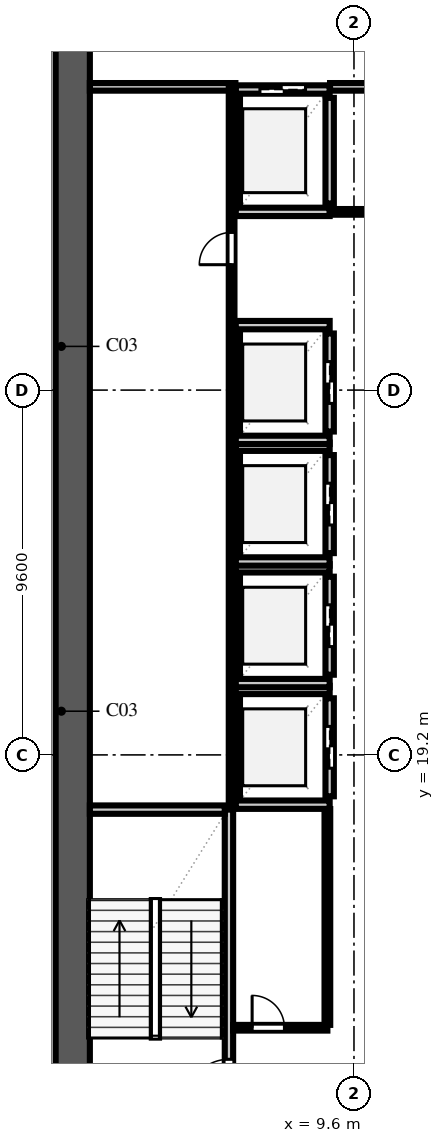
"""IFC4 building model, lengths in metres.
Left out: names, types, materials, properties, quantities, classifications, styles, units other than length and angle.
Written with IfcOpenShell. Run it as: python <this file> out.ifc"""

import sys

from ifc_helpers import new_model, si_unit, direction, frame, frame_2d, origin, place, context, subcontext, project, spatial, rectangle, extrude, element, fill, save


model = new_model("IFC4")
c1 = context("Model", 3, precision=1e-05, world=origin(), true_north=direction((0.0, 1.0)))
c2 = subcontext(c1, "Body", "Model", "MODEL_VIEW")
j1 = project(units=[si_unit("LENGTHUNIT", "METRE"), si_unit("PLANEANGLEUNIT", "RADIAN")], contexts=[c1])
p1 = place(None, origin())
s1 = spatial("IfcSite", under=j1, at=p1, CompositionType="ELEMENT")
p2 = place(p1, origin())
s2 = spatial("IfcBuilding", under=s1, at=p2, CompositionType="ELEMENT")
p3 = place(p2, frame((0.0, 0.0, 96.4)))
s3 = spatial("IfcBuildingStorey", under=s2, at=p3, CompositionType="ELEMENT", Elevation=96.4)
p4 = place(p3, frame((2.2, 9.15, 0.0), z_axis=(0.0, 0.0, 1.0), x_axis=(0.0, 1.0, 0.0)))
e1 = element("IfcWall", 1, at=p4, inside=s3, PredefinedType="SHEAR", context=c2, shape_type="SweptSolid", body=[
    extrude(rectangle(XDim=39.3, YDim=0.9, at=frame_2d((19.65, 0.0))), origin(), (0.0, 0.0, 1.0), 4.74),
])
p5 = place(p3, frame((6.31, 9.95, 0.0), z_axis=(0.0, 0.0, 1.0), x_axis=(0.0, 1.0, 0.0)))
e2 = element("IfcWall", 2, at=p5, inside=s3, PredefinedType="SOLIDWALL", context=c2, shape_type="SweptSolid", body=[
    extrude(rectangle(XDim=7.81, YDim=0.22, at=frame_2d((3.905, 0.0))), origin(), (0.0, 0.0, 1.0), 4.74),
])
p6 = place(p5, frame((0.14, 0.0, 0.0)))
e3 = element("IfcOpeningElement", 3, at=p6, cuts=e2, PredefinedType="OPENING", context=c2, shape_type="SweptSolid", body=[
    extrude(rectangle(XDim=1.1, YDim=2.2, at=frame_2d((0.55, 1.1))), frame((0.0, 0.122, 0.0), z_axis=(0.0, -1.0, 0.0), x_axis=(1.0, 0.0, 0.0)), (0.0, 0.0, 1.0), 0.244),
])
p7 = place(p3, frame((2.65, 17.76, 0.0), z_axis=(0.0, 0.0, 1.0), x_axis=(1.0, 0.0, 0.0)))
e4 = element("IfcWall", 4, at=p7, inside=s3, PredefinedType="SOLIDWALL", context=c2, shape_type="SweptSolid", body=[
    extrude(rectangle(XDim=3.55, YDim=0.22, at=frame_2d((1.775, 0.0))), origin(), (0.0, 0.0, 1.0), 4.74),
])
p8 = place(p3, frame((6.49, 18.11, 0.0), z_axis=(0.0, 0.0, 1.0), x_axis=(0.0, 1.0, 0.0)))
e5 = element("IfcWall", 5, at=p8, inside=s3, PredefinedType="SOLIDWALL", context=c2, shape_type="SweptSolid", body=[
    extrude(rectangle(XDim=2.58, YDim=0.22, at=frame_2d((1.29, 0.0))), origin(), (0.0, 0.0, 1.0), 4.74),
])
p9 = place(p3, frame((8.96, 18.11, 0.0), z_axis=(0.0, 0.0, 1.0), x_axis=(0.0, 1.0, 0.0)))
e6 = element("IfcWall", 6, at=p9, inside=s3, PredefinedType="SOLIDWALL", context=c2, shape_type="SweptSolid", body=[
    extrude(rectangle(XDim=2.58, YDim=0.22, at=frame_2d((1.29, 0.0))), origin(), (0.0, 0.0, 1.0), 4.74),
])
p10 = place(p9, frame((0.74, 0.0, 0.0)))
e7 = element("IfcOpeningElement", 7, at=p10, cuts=e6, PredefinedType="OPENING", context=c2, shape_type="SweptSolid", body=[
    extrude(rectangle(XDim=1.1, YDim=2.2, at=frame_2d((0.55, 1.1))), frame((0.0, 0.122, 0.0), z_axis=(0.0, -1.0, 0.0), x_axis=(1.0, 0.0, 0.0)), (0.0, 0.0, 1.0), 0.244),
])
for number, where, z_axis, x_axis in (
    (8, (6.49, 17.89, 0.0), (0.0, 0.0, 1.0), (1.0, 0.0, 0.0)),
    (9, (6.49, 20.91, 0.0), (0.0, 0.0, 1.0), (1.0, 0.0, 0.0)),
):
    element("IfcWall", number, at=place(p3, frame(where, z_axis=z_axis, x_axis=x_axis)), inside=s3, PredefinedType="SOLIDWALL", context=c2, shape_type="SweptSolid", body=[
        extrude(rectangle(XDim=2.47, YDim=0.22, at=frame_2d((1.235, 0.0))), origin(), (0.0, 0.0, 1.0), 4.74),
    ])
p11 = place(p3, frame((6.49, 21.31, 0.0), z_axis=(0.0, 0.0, 1.0), x_axis=(0.0, 1.0, 0.0)))
e10 = element("IfcWall", 10, at=p11, inside=s3, PredefinedType="SOLIDWALL", context=c2, shape_type="SweptSolid", body=[
    extrude(rectangle(XDim=2.58, YDim=0.22, at=frame_2d((1.29, 0.0))), origin(), (0.0, 0.0, 1.0), 4.74),
])
p12 = place(p3, frame((8.96, 21.31, 0.0), z_axis=(0.0, 0.0, 1.0), x_axis=(0.0, 1.0, 0.0)))
e11 = element("IfcWall", 11, at=p12, inside=s3, PredefinedType="SOLIDWALL", context=c2, shape_type="SweptSolid", body=[
    extrude(rectangle(XDim=2.58, YDim=0.22, at=frame_2d((1.29, 0.0))), origin(), (0.0, 0.0, 1.0), 4.74),
])
p13 = place(p12, frame((0.74, 0.0, 0.0)))
e12 = element("IfcOpeningElement", 12, at=p13, cuts=e11, PredefinedType="OPENING", context=c2, shape_type="SweptSolid", body=[
    extrude(rectangle(XDim=1.1, YDim=2.2, at=frame_2d((0.55, 1.1))), frame((0.0, 0.122, 0.0), z_axis=(0.0, -1.0, 0.0), x_axis=(1.0, 0.0, 0.0)), (0.0, 0.0, 1.0), 0.244),
])
for number, where, z_axis, x_axis in (
    (13, (6.49, 21.09, 0.0), (0.0, 0.0, 1.0), (1.0, 0.0, 0.0)),
    (14, (6.49, 24.11, 0.0), (0.0, 0.0, 1.0), (1.0, 0.0, 0.0)),
):
    element("IfcWall", number, at=place(p3, frame(where, z_axis=z_axis, x_axis=x_axis)), inside=s3, PredefinedType="SOLIDWALL", context=c2, shape_type="SweptSolid", body=[
        extrude(rectangle(XDim=2.47, YDim=0.22, at=frame_2d((1.235, 0.0))), origin(), (0.0, 0.0, 1.0), 4.74),
    ])
p14 = place(p3, frame((6.49, 24.51, 0.0), z_axis=(0.0, 0.0, 1.0), x_axis=(0.0, 1.0, 0.0)))
e15 = element("IfcWall", 15, at=p14, inside=s3, PredefinedType="SOLIDWALL", context=c2, shape_type="SweptSolid", body=[
    extrude(rectangle(XDim=2.58, YDim=0.22, at=frame_2d((1.29, 0.0))), origin(), (0.0, 0.0, 1.0), 4.74),
])
p15 = place(p3, frame((8.96, 24.51, 0.0), z_axis=(0.0, 0.0, 1.0), x_axis=(0.0, 1.0, 0.0)))
e16 = element("IfcWall", 16, at=p15, inside=s3, PredefinedType="SOLIDWALL", context=c2, shape_type="SweptSolid", body=[
    extrude(rectangle(XDim=2.58, YDim=0.22, at=frame_2d((1.29, 0.0))), origin(), (0.0, 0.0, 1.0), 4.74),
])
p16 = place(p15, frame((0.74, 0.0, 0.0)))
e17 = element("IfcOpeningElement", 17, at=p16, cuts=e16, PredefinedType="OPENING", context=c2, shape_type="SweptSolid", body=[
    extrude(rectangle(XDim=1.1, YDim=2.2, at=frame_2d((0.55, 1.1))), frame((0.0, 0.122, 0.0), z_axis=(0.0, -1.0, 0.0), x_axis=(1.0, 0.0, 0.0)), (0.0, 0.0, 1.0), 0.244),
])
for number, where, z_axis, x_axis in (
    (18, (6.49, 24.29, 0.0), (0.0, 0.0, 1.0), (1.0, 0.0, 0.0)),
    (19, (6.49, 27.31, 0.0), (0.0, 0.0, 1.0), (1.0, 0.0, 0.0)),
):
    element("IfcWall", number, at=place(p3, frame(where, z_axis=z_axis, x_axis=x_axis)), inside=s3, PredefinedType="SOLIDWALL", context=c2, shape_type="SweptSolid", body=[
        extrude(rectangle(XDim=2.47, YDim=0.22, at=frame_2d((1.235, 0.0))), origin(), (0.0, 0.0, 1.0), 4.74),
    ])
p17 = place(p3, frame((6.49, 27.71, 0.0), z_axis=(0.0, 0.0, 1.0), x_axis=(0.0, 1.0, 0.0)))
e20 = element("IfcWall", 20, at=p17, inside=s3, PredefinedType="SOLIDWALL", context=c2, shape_type="SweptSolid", body=[
    extrude(rectangle(XDim=2.58, YDim=0.22, at=frame_2d((1.29, 0.0))), origin(), (0.0, 0.0, 1.0), 4.74),
])
p18 = place(p3, frame((8.96, 27.71, 0.0), z_axis=(0.0, 0.0, 1.0), x_axis=(0.0, 1.0, 0.0)))
e21 = element("IfcWall", 21, at=p18, inside=s3, PredefinedType="SOLIDWALL", context=c2, shape_type="SweptSolid", body=[
    extrude(rectangle(XDim=2.58, YDim=0.22, at=frame_2d((1.29, 0.0))), origin(), (0.0, 0.0, 1.0), 4.74),
])
p19 = place(p18, frame((0.74, 0.0, 0.0)))
e22 = element("IfcOpeningElement", 22, at=p19, cuts=e21, PredefinedType="OPENING", context=c2, shape_type="SweptSolid", body=[
    extrude(rectangle(XDim=1.1, YDim=2.2, at=frame_2d((0.55, 1.1))), frame((0.0, 0.122, 0.0), z_axis=(0.0, -1.0, 0.0), x_axis=(1.0, 0.0, 0.0)), (0.0, 0.0, 1.0), 0.244),
])
for number, where, z_axis, x_axis in (
    (23, (6.49, 27.49, 0.0), (0.0, 0.0, 1.0), (1.0, 0.0, 0.0)),
    (24, (6.49, 30.51, 0.0), (0.0, 0.0, 1.0), (1.0, 0.0, 0.0)),
):
    element("IfcWall", number, at=place(p3, frame(where, z_axis=z_axis, x_axis=x_axis)), inside=s3, PredefinedType="SOLIDWALL", context=c2, shape_type="SweptSolid", body=[
        extrude(rectangle(XDim=2.47, YDim=0.22, at=frame_2d((1.235, 0.0))), origin(), (0.0, 0.0, 1.0), 4.74),
    ])
for number, where, z_axis, x_axis in (
    (25, (6.49, 33.71, 0.0), (0.0, 0.0, 1.0), (0.0, 1.0, 0.0)),
    (26, (8.96, 33.71, 0.0), (0.0, 0.0, 1.0), (0.0, 1.0, 0.0)),
):
    element("IfcWall", number, at=place(p3, frame(where, z_axis=z_axis, x_axis=x_axis)), inside=s3, PredefinedType="SOLIDWALL", context=c2, shape_type="SweptSolid", body=[
        extrude(rectangle(XDim=2.78, YDim=0.22, at=frame_2d((1.39, 0.0))), origin(), (0.0, 0.0, 1.0), 4.74),
    ])
p20 = place(p3, frame((6.49, 33.49, 0.0), z_axis=(0.0, 0.0, 1.0), x_axis=(1.0, 0.0, 0.0)))
e27 = element("IfcWall", 27, at=p20, inside=s3, PredefinedType="SOLIDWALL", context=c2, shape_type="SweptSolid", body=[
    extrude(rectangle(XDim=2.47, YDim=0.22, at=frame_2d((1.235, 0.0))), origin(), (0.0, 0.0, 1.0), 4.74),
])
p21 = place(p3, frame((6.49, 36.71, 0.0), z_axis=(0.0, 0.0, 1.0), x_axis=(1.0, 0.0, 0.0)))
e28 = element("IfcWall", 28, at=p21, inside=s3, PredefinedType="SOLIDWALL", context=c2, shape_type="SweptSolid", body=[
    extrude(rectangle(XDim=2.47, YDim=0.22, at=frame_2d((1.235, 0.0))), origin(), (0.0, 0.0, 1.0), 4.74),
])
p22 = place(p21, frame((0.635, 0.0, 0.0)))
e29 = element("IfcOpeningElement", 29, at=p22, cuts=e28, PredefinedType="OPENING", context=c2, shape_type="SweptSolid", body=[
    extrude(rectangle(XDim=1.2, YDim=2.2, at=frame_2d((0.6, 1.1))), frame((0.0, 0.122, 0.0), z_axis=(0.0, -1.0, 0.0), x_axis=(1.0, 0.0, 0.0)), (0.0, 0.0, 1.0), 0.244),
])
p23 = place(p3, frame((2.65, 36.78, 0.0), z_axis=(0.0, 0.0, 1.0), x_axis=(1.0, 0.0, 0.0)))
e30 = element("IfcWall", 30, at=p23, inside=s3, PredefinedType="SOLIDWALL", context=c2, shape_type="SweptSolid", body=[
    extrude(rectangle(XDim=3.83, YDim=0.2, at=frame_2d((1.915, 0.0))), origin(), (0.0, 0.0, 1.0), 4.74),
])
p24 = place(p3, frame((8.97, 36.78, 0.0), z_axis=(0.0, 0.0, 1.0), x_axis=(1.0, 0.0, 0.0)))
e31 = element("IfcWall", 31, at=p24, inside=s3, PredefinedType="SOLIDWALL", context=c2, shape_type="SweptSolid", body=[
    extrude(rectangle(XDim=1.51, YDim=0.2, at=frame_2d((0.755, 0.0))), origin(), (0.0, 0.0, 1.0), 4.74),
])
p25 = place(p3, frame((8.965, 33.49, 0.0), z_axis=(0.0, 0.0, 1.0), x_axis=(1.0, 0.0, 0.0)))
e32 = element("IfcWall", 32, at=p25, inside=s3, PredefinedType="PARTITIONING", context=c2, shape_type="SweptSolid", body=[
    extrude(rectangle(XDim=1.52, YDim=0.15, at=frame_2d((0.76, 0.0))), origin(), (0.0, 0.0, 1.0), 4.74),
])
p26 = place(p3, frame((6.42, 12.02, 0.0), z_axis=(0.0, 0.0, 1.0), x_axis=(1.0, 0.0, 0.0)))
e33 = element("IfcWall", 33, at=p26, inside=s3, PredefinedType="PARTITIONING", context=c2, shape_type="SweptSolid", body=[
    extrude(rectangle(XDim=2.48, YDim=0.15, at=frame_2d((1.24, 0.0))), origin(), (0.0, 0.0, 1.0), 4.74),
])
p27 = place(p26, frame((0.5, 0.0, 0.0)))
e34 = element("IfcOpeningElement", 34, at=p27, cuts=e33, PredefinedType="OPENING", context=c2, shape_type="SweptSolid", body=[
    extrude(rectangle(XDim=0.85, YDim=2.1, at=frame_2d((0.425, 1.05))), frame((0.0, 0.087, 0.0), z_axis=(0.0, -1.0, 0.0), x_axis=(1.0, 0.0, 0.0)), (0.0, 0.0, 1.0), 0.174),
])
p28 = place(p3, frame((8.9, 12.095, 0.0), z_axis=(0.0, 0.0, 1.0), x_axis=(0.0, 1.0, 0.0)))
e35 = element("IfcWall", 35, at=p28, inside=s3, PredefinedType="PARTITIONING", context=c2, shape_type="SweptSolid", body=[
    extrude(rectangle(XDim=5.68, YDim=0.15, at=frame_2d((2.84, 0.0))), origin(), (0.0, 0.0, 1.0), 4.74),
])
p29 = place(p3, frame((6.38, 17.8, 0.0), z_axis=(0.0, 0.0, 1.0), x_axis=(0.0, 1.0, 0.0)))
e36 = element("IfcWall", 36, at=p29, inside=s3, PredefinedType="PARTITIONING", context=c2, shape_type="SweptSolid", body=[
    extrude(rectangle(XDim=18.98, YDim=0.15, at=frame_2d((9.49, 0.0))), origin(), (0.0, 0.0, 1.0), 4.74),
])
p30 = place(p29, frame((14.3, 0.0, 0.0)))
e37 = element("IfcOpeningElement", 37, at=p30, cuts=e36, PredefinedType="OPENING", context=c2, shape_type="SweptSolid", body=[
    extrude(rectangle(XDim=0.85, YDim=2.1, at=frame_2d((0.425, 1.05))), frame((0.0, 0.087, 0.0), z_axis=(0.0, -1.0, 0.0), x_axis=(1.0, 0.0, 0.0)), (0.0, 0.0, 1.0), 0.174),
])
p31 = place(p6, origin())
e38 = element("IfcDoor", 38, at=p31, inside=s3, OperationType="SINGLE_SWING_LEFT", PredefinedType="DOOR", context=c2, shape_type="SweptSolid", body=[
    extrude(rectangle(XDim=1.1, YDim=2.2, at=frame_2d((0.55, 1.1))), frame((0.0, 0.025, 0.0), z_axis=(0.0, -1.0, 0.0), x_axis=(1.0, 0.0, 0.0)), (0.0, 0.0, 1.0), 0.05),
])
fill(e3, e38)
p32 = place(p10, origin())
e39 = element("IfcDoor", 39, at=p32, inside=s3, OperationType="DOUBLE_DOOR_SLIDING", PredefinedType="DOOR", context=c2, shape_type="SweptSolid", body=[
    extrude(rectangle(XDim=1.1, YDim=2.2, at=frame_2d((0.55, 1.1))), frame((0.0, 0.025, 0.0), z_axis=(0.0, -1.0, 0.0), x_axis=(1.0, 0.0, 0.0)), (0.0, 0.0, 1.0), 0.05),
])
fill(e7, e39)
p33 = place(p13, origin())
e40 = element("IfcDoor", 40, at=p33, inside=s3, OperationType="DOUBLE_DOOR_SLIDING", PredefinedType="DOOR", context=c2, shape_type="SweptSolid", body=[
    extrude(rectangle(XDim=1.1, YDim=2.2, at=frame_2d((0.55, 1.1))), frame((0.0, 0.025, 0.0), z_axis=(0.0, -1.0, 0.0), x_axis=(1.0, 0.0, 0.0)), (0.0, 0.0, 1.0), 0.05),
])
fill(e12, e40)
p34 = place(p16, origin())
e41 = element("IfcDoor", 41, at=p34, inside=s3, OperationType="DOUBLE_DOOR_SLIDING", PredefinedType="DOOR", context=c2, shape_type="SweptSolid", body=[
    extrude(rectangle(XDim=1.1, YDim=2.2, at=frame_2d((0.55, 1.1))), frame((0.0, 0.025, 0.0), z_axis=(0.0, -1.0, 0.0), x_axis=(1.0, 0.0, 0.0)), (0.0, 0.0, 1.0), 0.05),
])
fill(e17, e41)
p35 = place(p19, origin())
e42 = element("IfcDoor", 42, at=p35, inside=s3, OperationType="DOUBLE_DOOR_SLIDING", PredefinedType="DOOR", context=c2, shape_type="SweptSolid", body=[
    extrude(rectangle(XDim=1.1, YDim=2.2, at=frame_2d((0.55, 1.1))), frame((0.0, 0.025, 0.0), z_axis=(0.0, -1.0, 0.0), x_axis=(1.0, 0.0, 0.0)), (0.0, 0.0, 1.0), 0.05),
])
fill(e22, e42)
p36 = place(p22, origin())
e43 = element("IfcDoor", 43, at=p36, inside=s3, OperationType="DOUBLE_DOOR_SLIDING", PredefinedType="DOOR", context=c2, shape_type="SweptSolid", body=[
    extrude(rectangle(XDim=1.2, YDim=2.2, at=frame_2d((0.6, 1.1))), frame((0.0, 0.025, 0.0), z_axis=(0.0, -1.0, 0.0), x_axis=(1.0, 0.0, 0.0)), (0.0, 0.0, 1.0), 0.05),
])
fill(e29, e43)
p37 = place(p27, origin())
e44 = element("IfcDoor", 44, at=p37, inside=s3, OperationType="SINGLE_SWING_LEFT", PredefinedType="DOOR", context=c2, shape_type="SweptSolid", body=[
    extrude(rectangle(XDim=0.85, YDim=2.1, at=frame_2d((0.425, 1.05))), frame((0.0, 0.025, 0.0), z_axis=(0.0, -1.0, 0.0), x_axis=(1.0, 0.0, 0.0)), (0.0, 0.0, 1.0), 0.05),
])
fill(e34, e44)
p38 = place(p30, origin())
e45 = element("IfcDoor", 45, at=p38, inside=s3, OperationType="SINGLE_SWING_LEFT", PredefinedType="DOOR", context=c2, shape_type="SweptSolid", body=[
    extrude(rectangle(XDim=0.85, YDim=2.1, at=frame_2d((0.425, 1.05))), frame((0.0, 0.025, 0.0), z_axis=(0.0, -1.0, 0.0), x_axis=(1.0, 0.0, 0.0)), (0.0, 0.0, 1.0), 0.05),
])
fill(e37, e45)
save(model, sys.argv[1])
